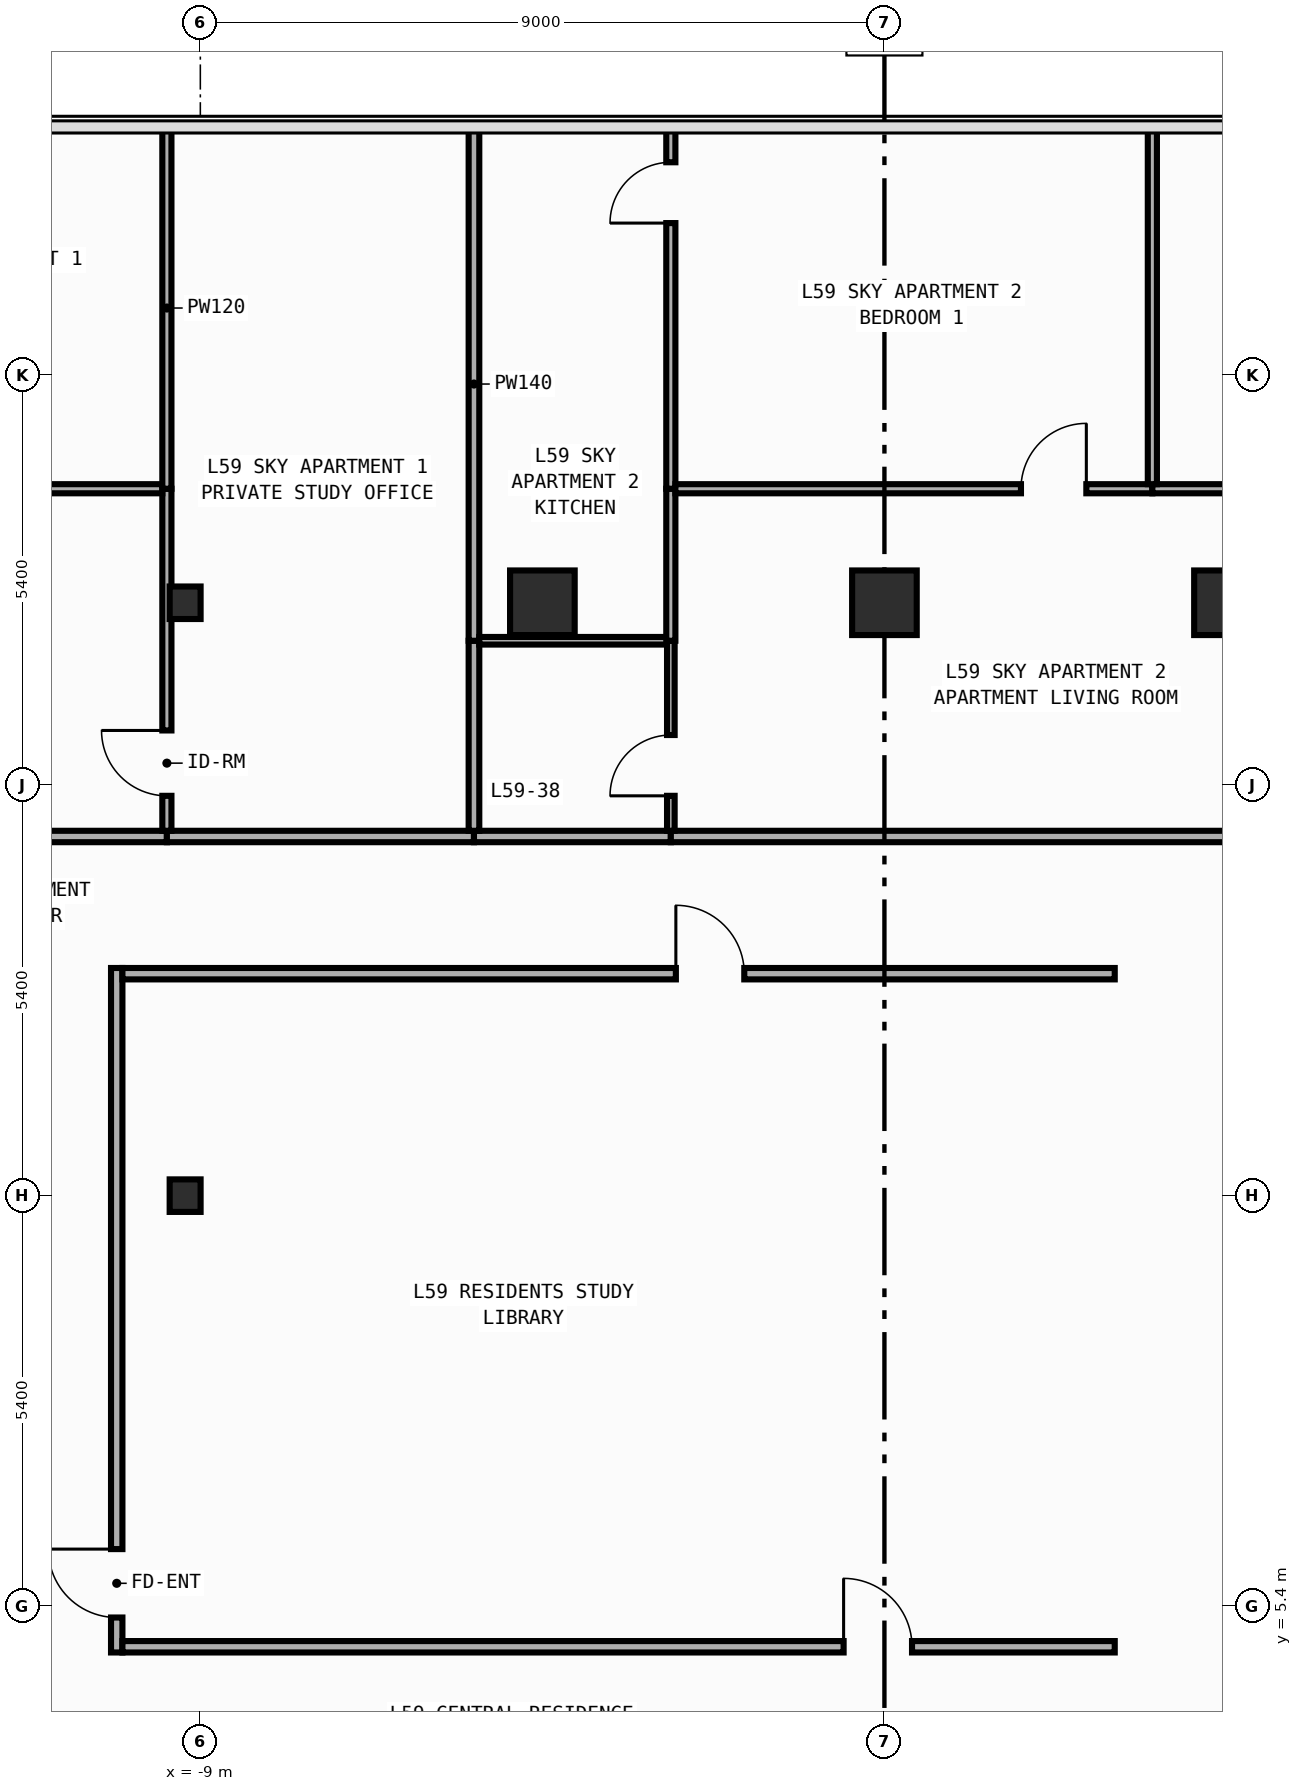
"""IFC4 building model, lengths in metres.
Left out: names, types, materials, properties, quantities, classifications, styles, units other than length and angle.
Written with IfcOpenShell. Run it as: python <this file> out.ifc"""

import sys

from ifc_helpers import new_model, si_unit, direction, frame, frame_2d, origin, origin_2d, place, context, subcontext, project, spatial, rectangle, i_section, extrude, element, fill, save


model = new_model("IFC4")
c1 = context("Model", 3, precision=1e-05, world=origin(), true_north=direction((0.0, 1.0)))
c2 = subcontext(c1, "Body", "Model", "MODEL_VIEW")
j1 = project(units=[si_unit("LENGTHUNIT", "METRE"), si_unit("PLANEANGLEUNIT", "RADIAN")], contexts=[c1])
p1 = place(None, origin())
s1 = spatial("IfcSite", under=j1, at=p1, CompositionType="ELEMENT")
p2 = place(p1, origin())
s2 = spatial("IfcBuilding", under=s1, at=p2, CompositionType="ELEMENT")
p3 = place(p2, frame((0.0, 0.0, 251.2)))
s3 = spatial("IfcBuildingStorey", under=s2, at=p3, CompositionType="ELEMENT", Elevation=251.2)
for number, where, z_axis, x_axis in (
    (1, (-9.2, 10.8, 0.0), (0.0, 0.0, 1.0), (1.0, 0.0, 0.0)),
    (2, (-9.2, 18.6, 0.0), (0.0, 0.0, 1.0), (1.0, 0.0, 0.0)),
):
    element("IfcColumn", number, at=place(p3, frame(where, z_axis=z_axis, x_axis=x_axis)), inside=s3, PredefinedType="COLUMN", context=c2, shape_type="SweptSolid", body=[
        extrude(i_section(OverallWidth=0.407, OverallDepth=0.428, WebThickness=0.02, FlangeThickness=0.035, FilletRadius=0.022, at=origin_2d()), origin(), (0.0, 0.0, 1.0), 3.6),
    ])
for number, where, z_axis, x_axis in (
    (3, (-4.5, 18.6, 0.0), (0.0, 0.0, 1.0), (1.0, 0.0, 0.0)),
    (4, (0.0, 18.6, 0.0), (0.0, 0.0, 1.0), (1.0, 0.0, 0.0)),
    (5, (4.5, 18.6, 0.0), (0.0, 0.0, 1.0), (1.0, 0.0, 0.0)),
):
    element("IfcColumn", number, at=place(p3, frame(where, z_axis=z_axis, x_axis=x_axis)), inside=s3, PredefinedType="COLUMN", context=c2, shape_type="SweptSolid", body=[
        extrude(rectangle(XDim=0.85, YDim=0.85, at=origin_2d()), origin(), (0.0, 0.0, 1.0), 3.6),
    ])
p4 = place(p3, frame((-10.1, 4.79, 0.0), z_axis=(0.0, 0.0, 1.0), x_axis=(0.0, 1.0, 0.0)))
e6 = element("IfcWall", 6, at=p4, inside=s3, PredefinedType="PARTITIONING", context=c2, shape_type="SweptSolid", body=[
    extrude(rectangle(XDim=9.005, YDim=0.15, at=frame_2d((4.502, 0.0))), origin(), (0.0, 0.0, 1.0), 3.34),
])
p5 = place(p4, frame((0.46, 0.0, 0.0)))
e7 = element("IfcOpeningElement", 7, at=p5, cuts=e6, PredefinedType="OPENING", context=c2, shape_type="SweptSolid", body=[
    extrude(rectangle(XDim=0.9, YDim=2.15, at=frame_2d((0.45, 1.075))), frame((0.0, 0.085, 0.0), z_axis=(0.0, -1.0, 0.0), x_axis=(1.0, 0.0, 0.0)), (0.0, 0.0, 1.0), 0.17),
])
p6 = place(p3, frame((-10.025, 4.865, 0.0), z_axis=(0.0, 0.0, 1.0), x_axis=(1.0, 0.0, 0.0)))
e8 = element("IfcWall", 8, at=p6, inside=s3, PredefinedType="PARTITIONING", context=c2, shape_type="SweptSolid", body=[
    extrude(rectangle(XDim=13.055, YDim=0.15, at=frame_2d((6.527, 0.0))), origin(), (0.0, 0.0, 1.0), 3.34),
])
p7 = place(p6, frame((9.488, 0.0, 0.0)))
e9 = element("IfcOpeningElement", 9, at=p7, cuts=e8, PredefinedType="OPENING", context=c2, shape_type="SweptSolid", body=[
    extrude(rectangle(XDim=0.9, YDim=2.15, at=frame_2d((0.45, 1.075))), frame((0.0, 0.085, 0.0), z_axis=(0.0, -1.0, 0.0), x_axis=(1.0, 0.0, 0.0)), (0.0, 0.0, 1.0), 0.17),
])
p8 = place(p3, frame((-19.31, 15.525, 0.0), z_axis=(0.0, 0.0, 1.0), x_axis=(1.0, 0.0, 0.0)))
e10 = element("IfcWall", 10, at=p8, inside=s3, PredefinedType="PARTITIONING", context=c2, shape_type="SweptSolid", body=[
    extrude(rectangle(XDim=9.87, YDim=0.15, at=frame_2d((4.935, 0.0))), origin(), (0.0, 0.0, 1.0), 3.34),
])
p9 = place(p8, frame((1.466, 0.0, 0.0)))
e11 = element("IfcOpeningElement", 11, at=p9, cuts=e10, PredefinedType="OPENING", context=c2, shape_type="SweptSolid", body=[
    extrude(rectangle(XDim=0.9, YDim=2.15, at=frame_2d((0.45, 1.075))), frame((0.0, 0.085, 0.0), z_axis=(0.0, -1.0, 0.0), x_axis=(1.0, 0.0, 0.0)), (0.0, 0.0, 1.0), 0.17),
])
p10 = place(p3, frame((-9.44, 15.525, 0.0), z_axis=(0.0, 0.0, 1.0), x_axis=(1.0, 0.0, 0.0)))
e12 = element("IfcWall", 12, at=p10, inside=s3, PredefinedType="PARTITIONING", context=c2, shape_type="SweptSolid", body=[
    extrude(rectangle(XDim=4.04, YDim=0.15, at=frame_2d((2.02, 0.0))), origin(), (0.0, 0.0, 1.0), 3.34),
])
p11 = place(p3, frame((-5.4, 15.525, 0.0), z_axis=(0.0, 0.0, 1.0), x_axis=(1.0, 0.0, 0.0)))
e13 = element("IfcWall", 13, at=p11, inside=s3, PredefinedType="PARTITIONING", context=c2, shape_type="SweptSolid", body=[
    extrude(rectangle(XDim=2.59, YDim=0.15, at=frame_2d((1.295, 0.0))), origin(), (0.0, 0.0, 1.0), 3.34),
])
p12 = place(p3, frame((-2.81, 15.525, 0.0), z_axis=(0.0, 0.0, 1.0), x_axis=(1.0, 0.0, 0.0)))
e14 = element("IfcWall", 14, at=p12, inside=s3, PredefinedType="PARTITIONING", context=c2, shape_type="SweptSolid", body=[
    extrude(rectangle(XDim=12.67, YDim=0.15, at=frame_2d((6.335, 0.0))), origin(), (0.0, 0.0, 1.0), 3.34),
])
p13 = place(p12, frame((9.301, 0.0, 0.0)))
e15 = element("IfcOpeningElement", 15, at=p13, cuts=e14, PredefinedType="OPENING", context=c2, shape_type="SweptSolid", body=[
    extrude(rectangle(XDim=0.9, YDim=2.15, at=frame_2d((0.45, 1.075))), frame((0.0, 0.085, 0.0), z_axis=(0.0, -1.0, 0.0), x_axis=(1.0, 0.0, 0.0)), (0.0, 0.0, 1.0), 0.17),
])
p14 = place(p3, frame((-10.025, 13.72, 0.0), z_axis=(0.0, 0.0, 1.0), x_axis=(1.0, 0.0, 0.0)))
e16 = element("IfcWall", 16, at=p14, inside=s3, PredefinedType="PARTITIONING", context=c2, shape_type="SweptSolid", body=[
    extrude(rectangle(XDim=13.055, YDim=0.15, at=frame_2d((6.527, 0.0))), origin(), (0.0, 0.0, 1.0), 3.34),
])
p15 = place(p14, frame((7.281, 0.0, 0.0)))
e17 = element("IfcOpeningElement", 17, at=p15, cuts=e16, PredefinedType="OPENING", context=c2, shape_type="SweptSolid", body=[
    extrude(rectangle(XDim=0.9, YDim=2.15, at=frame_2d((0.45, 1.075))), frame((0.0, 0.085, 0.0), z_axis=(0.0, -1.0, 0.0), x_axis=(1.0, 0.0, 0.0)), (0.0, 0.0, 1.0), 0.17),
])
p16 = place(p3, frame((-9.44, 15.6, 0.0), z_axis=(0.0, 0.0, 1.0), x_axis=(0.0, 1.0, 0.0)))
e18 = element("IfcWall", 18, at=p16, inside=s3, PredefinedType="PARTITIONING", context=c2, shape_type="SweptSolid", body=[
    extrude(rectangle(XDim=4.5, YDim=0.12, at=frame_2d((2.25, 0.0))), origin(), (0.0, 0.0, 1.0), 2.44),
])
p17 = place(p16, frame((0.46, 0.0, 0.0)))
e19 = element("IfcOpeningElement", 19, at=p17, cuts=e18, PredefinedType="OPENING", context=c2, shape_type="SweptSolid", body=[
    extrude(rectangle(XDim=0.86, YDim=2.15, at=frame_2d((0.43, 1.075))), frame((0.0, 0.07, 0.0), z_axis=(0.0, -1.0, 0.0), x_axis=(1.0, 0.0, 0.0)), (0.0, 0.0, 1.0), 0.14),
])
p18 = place(p3, frame((-14.375, 20.1, 0.0), z_axis=(0.0, 0.0, 1.0), x_axis=(1.0, 0.0, 0.0)))
e20 = element("IfcWall", 20, at=p18, inside=s3, PredefinedType="PARTITIONING", context=c2, shape_type="SweptSolid", body=[
    extrude(rectangle(XDim=4.875, YDim=0.12, at=frame_2d((2.438, 0.0))), origin(), (0.0, 0.0, 1.0), 3.34),
])
p19 = place(p18, frame((2.317, 0.0, 0.0)))
e21 = element("IfcOpeningElement", 21, at=p19, cuts=e20, PredefinedType="OPENING", context=c2, shape_type="SweptSolid", body=[
    extrude(rectangle(XDim=0.86, YDim=2.15, at=frame_2d((0.43, 1.075))), frame((0.0, 0.07, 0.0), z_axis=(0.0, -1.0, 0.0), x_axis=(1.0, 0.0, 0.0)), (0.0, 0.0, 1.0), 0.14),
])
p20 = place(p3, frame((-9.44, 20.1, 0.0), z_axis=(0.0, 0.0, 1.0), x_axis=(0.0, 1.0, 0.0)))
e22 = element("IfcWall", 22, at=p20, inside=s3, PredefinedType="PARTITIONING", context=c2, shape_type="SweptSolid", body=[
    extrude(rectangle(XDim=4.755, YDim=0.12, at=frame_2d((2.377, 0.0))), origin(), (0.0, 0.0, 1.0), 3.34),
])
p21 = place(p3, frame((-5.4, 15.6, 0.0), z_axis=(0.0, 0.0, 1.0), x_axis=(0.0, 1.0, 0.0)))
e23 = element("IfcWall", 23, at=p21, inside=s3, PredefinedType="PARTITIONING", context=c2, shape_type="SweptSolid", body=[
    extrude(rectangle(XDim=2.5, YDim=0.14, at=frame_2d((1.25, 0.0))), origin(), (0.0, 0.0, 1.0), 3.34),
])
p22 = place(p3, frame((-5.4, 18.1, 0.0), z_axis=(0.0, 0.0, 1.0), x_axis=(0.0, 1.0, 0.0)))
e24 = element("IfcWall", 24, at=p22, inside=s3, PredefinedType="PARTITIONING", context=c2, shape_type="SweptSolid", body=[
    extrude(rectangle(XDim=6.755, YDim=0.14, at=frame_2d((3.377, 0.0))), origin(), (0.0, 0.0, 1.0), 3.34),
])
p23 = place(p3, frame((-5.33, 18.1, 0.0), z_axis=(0.0, 0.0, 1.0), x_axis=(1.0, 0.0, 0.0)))
e25 = element("IfcWall", 25, at=p23, inside=s3, PredefinedType="PARTITIONING", context=c2, shape_type="SweptSolid", body=[
    extrude(rectangle(XDim=2.47, YDim=0.1, at=frame_2d((1.235, 0.0))), origin(), (0.0, 0.0, 1.0), 3.34),
])
p24 = place(p3, frame((-2.81, 15.6, 0.0), z_axis=(0.0, 0.0, 1.0), x_axis=(0.0, 1.0, 0.0)))
e26 = element("IfcWall", 26, at=p24, inside=s3, PredefinedType="PARTITIONING", context=c2, shape_type="SweptSolid", body=[
    extrude(rectangle(XDim=2.5, YDim=0.1, at=frame_2d((1.25, 0.0))), origin(), (0.0, 0.0, 1.0), 3.34),
])
p25 = place(p24, frame((0.46, 0.0, 0.0)))
e27 = element("IfcOpeningElement", 27, at=p25, cuts=e26, PredefinedType="OPENING", context=c2, shape_type="SweptSolid", body=[
    extrude(rectangle(XDim=0.8, YDim=2.1, at=frame_2d((0.4, 1.05))), frame((0.0, 0.06, 0.0), z_axis=(0.0, -1.0, 0.0), x_axis=(1.0, 0.0, 0.0)), (0.0, 0.0, 1.0), 0.12),
])
p26 = place(p3, frame((-2.81, 18.1, 0.0), z_axis=(0.0, 0.0, 1.0), x_axis=(0.0, 1.0, 0.0)))
e28 = element("IfcWall", 28, at=p26, inside=s3, PredefinedType="PARTITIONING", context=c2, shape_type="SweptSolid", body=[
    extrude(rectangle(XDim=2.0, YDim=0.12, at=frame_2d((1.0, 0.0))), origin(), (0.0, 0.0, 1.0), 3.34),
])
p27 = place(p3, frame((-2.81, 20.1, 0.0), z_axis=(0.0, 0.0, 1.0), x_axis=(0.0, 1.0, 0.0)))
e29 = element("IfcWall", 29, at=p27, inside=s3, PredefinedType="PARTITIONING", context=c2, shape_type="SweptSolid", body=[
    extrude(rectangle(XDim=4.755, YDim=0.12, at=frame_2d((2.377, 0.0))), origin(), (0.0, 0.0, 1.0), 3.34),
])
p28 = place(p27, frame((3.495, 0.0, 0.0)))
e30 = element("IfcOpeningElement", 30, at=p28, cuts=e29, PredefinedType="OPENING", context=c2, shape_type="SweptSolid", body=[
    extrude(rectangle(XDim=0.8, YDim=2.1, at=frame_2d((0.4, 1.05))), frame((0.0, 0.07, 0.0), z_axis=(0.0, -1.0, 0.0), x_axis=(1.0, 0.0, 0.0)), (0.0, 0.0, 1.0), 0.14),
])
p29 = place(p3, frame((-2.75, 20.1, 0.0), z_axis=(0.0, 0.0, 1.0), x_axis=(1.0, 0.0, 0.0)))
e31 = element("IfcWall", 31, at=p29, inside=s3, PredefinedType="PARTITIONING", context=c2, shape_type="SweptSolid", body=[
    extrude(rectangle(XDim=6.275, YDim=0.12, at=frame_2d((3.137, 0.0))), origin(), (0.0, 0.0, 1.0), 3.34),
])
p30 = place(p29, frame((4.546, 0.0, 0.0)))
e32 = element("IfcOpeningElement", 32, at=p30, cuts=e31, PredefinedType="OPENING", context=c2, shape_type="SweptSolid", body=[
    extrude(rectangle(XDim=0.86, YDim=2.15, at=frame_2d((0.43, 1.075))), frame((0.0, 0.07, 0.0), z_axis=(0.0, -1.0, 0.0), x_axis=(1.0, 0.0, 0.0)), (0.0, 0.0, 1.0), 0.14),
])
p31 = place(p3, frame((3.525, 20.1, 0.0), z_axis=(0.0, 0.0, 1.0), x_axis=(1.0, 0.0, 0.0)))
e33 = element("IfcWall", 33, at=p31, inside=s3, PredefinedType="PARTITIONING", context=c2, shape_type="SweptSolid", body=[
    extrude(rectangle(XDim=6.275, YDim=0.12, at=frame_2d((3.138, 0.0))), origin(), (0.0, 0.0, 1.0), 3.34),
])
p32 = place(p31, frame((3.116, 0.0, 0.0)))
e34 = element("IfcOpeningElement", 34, at=p32, cuts=e33, PredefinedType="OPENING", context=c2, shape_type="SweptSolid", body=[
    extrude(rectangle(XDim=0.86, YDim=2.15, at=frame_2d((0.43, 1.075))), frame((0.0, 0.07, 0.0), z_axis=(0.0, -1.0, 0.0), x_axis=(1.0, 0.0, 0.0)), (0.0, 0.0, 1.0), 0.14),
])
p33 = place(p3, frame((3.525, 20.16, 0.0), z_axis=(0.0, 0.0, 1.0), x_axis=(0.0, 1.0, 0.0)))
e35 = element("IfcWall", 35, at=p33, inside=s3, PredefinedType="PARTITIONING", context=c2, shape_type="SweptSolid", body=[
    extrude(rectangle(XDim=4.695, YDim=0.12, at=frame_2d((2.348, 0.0))), origin(), (0.0, 0.0, 1.0), 3.34),
])
p34 = place(p5, origin())
e36 = element("IfcDoor", 36, at=p34, inside=s3, OperationType="SINGLE_SWING_RIGHT", PredefinedType="DOOR", context=c2, shape_type="SweptSolid", body=[
    extrude(rectangle(XDim=0.9, YDim=2.15, at=frame_2d((0.45, 1.075))), frame((0.0, 0.025, 0.0), z_axis=(0.0, -1.0, 0.0), x_axis=(1.0, 0.0, 0.0)), (0.0, 0.0, 1.0), 0.05),
])
fill(e7, e36)
p35 = place(p7, origin())
e37 = element("IfcDoor", 37, at=p35, inside=s3, OperationType="SINGLE_SWING_LEFT", PredefinedType="DOOR", context=c2, shape_type="SweptSolid", body=[
    extrude(rectangle(XDim=0.9, YDim=2.15, at=frame_2d((0.45, 1.075))), frame((0.0, 0.025, 0.0), z_axis=(0.0, -1.0, 0.0), x_axis=(1.0, 0.0, 0.0)), (0.0, 0.0, 1.0), 0.05),
])
fill(e9, e37)
p36 = place(p15, origin())
e38 = element("IfcDoor", 38, at=p36, inside=s3, OperationType="SINGLE_SWING_LEFT", PredefinedType="DOOR", context=c2, shape_type="SweptSolid", body=[
    extrude(rectangle(XDim=0.9, YDim=2.15, at=frame_2d((0.45, 1.075))), frame((0.0, 0.025, 0.0), z_axis=(0.0, -1.0, 0.0), x_axis=(1.0, 0.0, 0.0)), (0.0, 0.0, 1.0), 0.05),
])
fill(e17, e38)
p37 = place(p17, origin())
e39 = element("IfcDoor", 39, at=p37, inside=s3, OperationType="SINGLE_SWING_RIGHT", PredefinedType="DOOR", context=c2, shape_type="SweptSolid", body=[
    extrude(rectangle(XDim=0.86, YDim=2.15, at=frame_2d((0.43, 1.075))), frame((0.0, 0.025, 0.0), z_axis=(0.0, -1.0, 0.0), x_axis=(1.0, 0.0, 0.0)), (0.0, 0.0, 1.0), 0.05),
])
fill(e19, e39)
p38 = place(p25, origin())
e40 = element("IfcDoor", 40, at=p38, inside=s3, OperationType="SINGLE_SWING_LEFT", PredefinedType="DOOR", context=c2, shape_type="SweptSolid", body=[
    extrude(rectangle(XDim=0.8, YDim=2.1, at=frame_2d((0.4, 1.05))), frame((0.0, 0.025, 0.0), z_axis=(0.0, -1.0, 0.0), x_axis=(1.0, 0.0, 0.0)), (0.0, 0.0, 1.0), 0.05),
])
fill(e27, e40)
p39 = place(p30, origin())
e41 = element("IfcDoor", 41, at=p39, inside=s3, OperationType="SINGLE_SWING_RIGHT", PredefinedType="DOOR", context=c2, shape_type="SweptSolid", body=[
    extrude(rectangle(XDim=0.86, YDim=2.15, at=frame_2d((0.43, 1.075))), frame((0.0, 0.025, 0.0), z_axis=(0.0, -1.0, 0.0), x_axis=(1.0, 0.0, 0.0)), (0.0, 0.0, 1.0), 0.05),
])
fill(e32, e41)
p40 = place(p28, origin())
e42 = element("IfcDoor", 42, at=p40, inside=s3, OperationType="SINGLE_SWING_LEFT", PredefinedType="DOOR", context=c2, shape_type="SweptSolid", body=[
    extrude(rectangle(XDim=0.8, YDim=2.1, at=frame_2d((0.4, 1.05))), frame((0.0, 0.025, 0.0), z_axis=(0.0, -1.0, 0.0), x_axis=(1.0, 0.0, 0.0)), (0.0, 0.0, 1.0), 0.05),
])
fill(e30, e42)
save(model, sys.argv[1])
